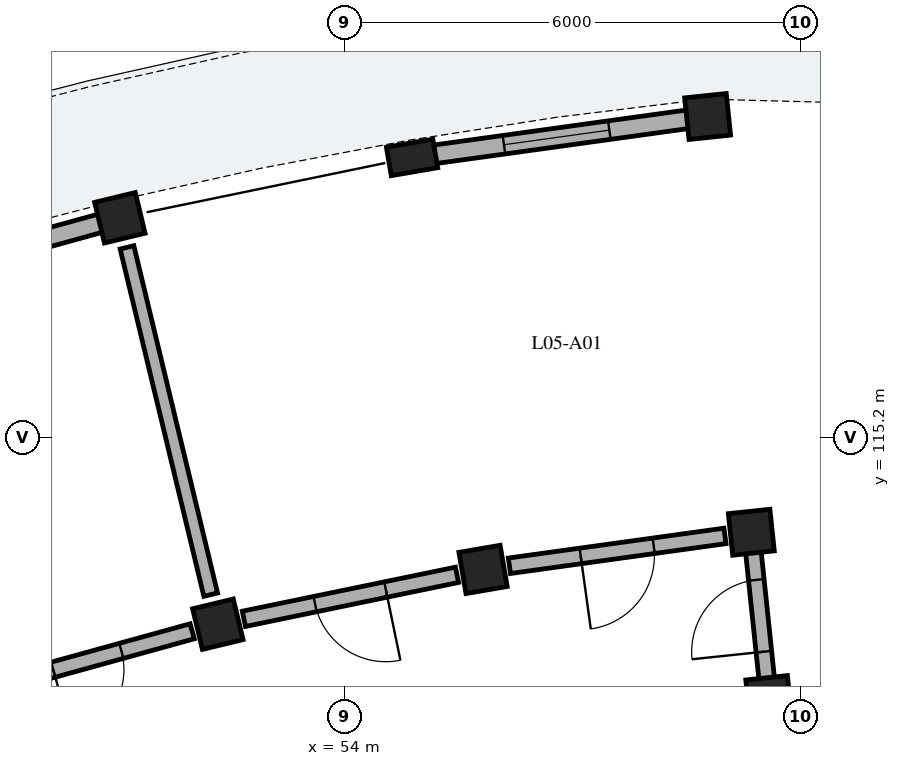
"""IFC4 building model, lengths in metres.
Left out: names, types, materials, properties, quantities, classifications, styles, units other than length and angle.
Written with IfcOpenShell. Run it as: python <this file> out.ifc"""

import sys

from ifc_helpers import new_model, si_unit, direction, frame, frame_2d, origin, origin_2d, place, context, subcontext, project, spatial, rectangle, extrude, element, fill, save


model = new_model("IFC4")
c1 = context("Model", 3, precision=1e-05, world=origin(), true_north=direction((0.0, 1.0)))
c2 = subcontext(c1, "Body", "Model", "MODEL_VIEW")
j1 = project(units=[si_unit("LENGTHUNIT", "METRE"), si_unit("PLANEANGLEUNIT", "RADIAN")], contexts=[c1])
p1 = place(None, origin())
s1 = spatial("IfcSite", under=j1, at=p1, CompositionType="ELEMENT")
p2 = place(p1, origin())
s2 = spatial("IfcBuilding", under=s1, at=p2, CompositionType="ELEMENT")
p3 = place(p2, frame((0.0, 0.0, 18.92)))
s3 = spatial("IfcBuildingStorey", under=s2, at=p3, CompositionType="ELEMENT", Elevation=18.92)
for number, where, z_axis, x_axis in (
    (1, (59.58, 111.766, 0.0), (0.0, 0.0, 1.0), (-0.105, 0.995, 0.0)),
    (2, (59.35, 113.954, 0.0), (0.0, 0.0, 1.0), (-0.105, 0.995, 0.0)),
    (3, (58.775, 119.424, 0.0), (0.0, 0.0, 1.0), (-0.105, 0.995, 0.0)),
    (4, (55.821, 113.465, 0.0), (0.0, 0.0, 1.0), (-0.17, 0.985, 0.0)),
):
    element("IfcColumn", number, at=place(p3, frame(where, z_axis=z_axis, x_axis=x_axis)), inside=s3, PredefinedType="COLUMN", context=c2, shape_type="SweptSolid", body=[
        extrude(rectangle(XDim=0.55, YDim=0.55, at=origin_2d()), origin(), (0.0, 0.0, 1.0), 3.11),
    ])
p4 = place(p3, frame((54.887, 118.885, 0.0), z_axis=(0.0, 0.0, 1.0), x_axis=(-0.169827298811, 0.985473839622, 0.0)))
e5 = element("IfcColumn", 5, at=p4, inside=s3, PredefinedType="PILASTER", context=c2, shape_type="SweptSolid", body=[
    extrude(rectangle(XDim=0.38, YDim=0.62, at=origin_2d()), origin(), (0.0, 0.0, 1.0), 3.11),
])
for number, where, z_axis, x_axis in (
    (6, (52.331, 112.744, 0.0), (0.0, 0.0, 1.0), (-0.234, 0.972, 0.0)),
    (7, (51.042, 118.091, 0.0), (0.0, 0.0, 1.0), (-0.234, 0.972, 0.0)),
):
    element("IfcColumn", number, at=place(p3, frame(where, z_axis=z_axis, x_axis=x_axis)), inside=s3, PredefinedType="COLUMN", context=c2, shape_type="SweptSolid", body=[
        extrude(rectangle(XDim=0.55, YDim=0.55, at=origin_2d()), origin(), (0.0, 0.0, 1.0), 3.11),
    ])
p5 = place(p3, frame((58.533, 119.39, 0.0), z_axis=(0.0, 0.0, 1.0), x_axis=(-0.990539718913, -0.137226328578, 0.0)))
e8 = element("IfcWall", 8, at=p5, inside=s3, PredefinedType="SOLIDWALL", context=c2, shape_type="SweptSolid", body=[
    extrude(rectangle(XDim=3.521, YDim=0.245, at=frame_2d((1.76, 0.0))), origin(), (0.0, 0.0, 1.0), 2.355),
])
p6 = place(p5, frame((1.06, 0.0, 0.35)))
e9 = element("IfcOpeningElement", 9, at=p6, cuts=e8, PredefinedType="OPENING", context=c2, shape_type="SweptSolid", body=[
    extrude(rectangle(XDim=1.4, YDim=1.65, at=frame_2d((0.7, 0.825))), frame((0.0, 0.133, 0.0), z_axis=(0.0, -1.0, 0.0), x_axis=(1.0, 0.0, 0.0)), (0.0, 0.0, 1.0), 0.265),
])
p7 = place(p3, frame((50.806, 118.026, 0.0), z_axis=(0.0, 0.0, 1.0), x_axis=(-0.963899390209, -0.266266718826, 0.0)))
e10 = element("IfcWall", 10, at=p7, inside=s3, PredefinedType="SOLIDWALL", context=c2, shape_type="SweptSolid", body=[
    extrude(rectangle(XDim=3.521, YDim=0.245, at=frame_2d((1.76, 0.0))), origin(), (0.0, 0.0, 1.0), 2.355),
])
p8 = place(p7, frame((1.25, 0.0, 0.0)))
e11 = element("IfcOpeningElement", 11, at=p8, cuts=e10, PredefinedType="OPENING", context=c2, shape_type="SweptSolid", body=[
    extrude(rectangle(XDim=1.02, YDim=2.14, at=frame_2d((0.51, 1.07))), frame((0.0, 0.133, 0.0), z_axis=(0.0, -1.0, 0.0), x_axis=(1.0, 0.0, 0.0)), (0.0, 0.0, 1.0), 0.265),
])
p9 = place(p3, frame((59.004, 113.906, 0.0), z_axis=(0.0, 0.0, 1.0), x_axis=(-0.990544162976, -0.137194246211, 0.0)))
e12 = element("IfcWall", 12, at=p9, inside=s3, PredefinedType="PARTITIONING", context=c2, shape_type="SweptSolid", body=[
    extrude(rectangle(XDim=2.863, YDim=0.205, at=frame_2d((1.432, 0.0))), origin(), (0.0, 0.0, 1.0), 2.37),
])
p10 = place(p9, frame((0.947, 0.0, 0.0)))
e13 = element("IfcOpeningElement", 13, at=p10, cuts=e12, PredefinedType="OPENING", context=c2, shape_type="SweptSolid", body=[
    extrude(rectangle(XDim=0.97, YDim=2.15, at=frame_2d((0.485, 1.075))), frame((0.0, 0.113, 0.0), z_axis=(0.0, -1.0, 0.0), x_axis=(1.0, 0.0, 0.0)), (0.0, 0.0, 1.0), 0.225),
])
p11 = place(p3, frame((55.478, 113.394, 0.0), z_axis=(0.0, 0.0, 1.0), x_axis=(-0.979348418612, -0.202179808492, 0.0)))
e14 = element("IfcWall", 14, at=p11, inside=s3, PredefinedType="PARTITIONING", context=c2, shape_type="SweptSolid", body=[
    extrude(rectangle(XDim=2.863, YDim=0.205, at=frame_2d((1.432, 0.0))), origin(), (0.0, 0.0, 1.0), 2.37),
])
p12 = place(p11, frame((0.957, 0.0, 0.0)))
e15 = element("IfcOpeningElement", 15, at=p12, cuts=e14, PredefinedType="OPENING", context=c2, shape_type="SweptSolid", body=[
    extrude(rectangle(XDim=0.95, YDim=2.13, at=frame_2d((0.475, 1.065))), frame((0.0, 0.113, 0.0), z_axis=(0.0, -1.0, 0.0), x_axis=(1.0, 0.0, 0.0)), (0.0, 0.0, 1.0), 0.225),
])
p13 = place(p3, frame((52.238, 113.133, 0.0), z_axis=(0.0, 0.0, 1.0), x_axis=(-0.234386624934, 0.972143461662, 0.0)))
e16 = element("IfcWall", 16, at=p13, inside=s3, PredefinedType="PARTITIONING", context=c2, shape_type="SweptSolid", body=[
    extrude(rectangle(XDim=4.7, YDim=0.185, at=frame_2d((2.35, 0.0))), origin(), (0.0, 0.0, 1.0), 2.37),
])
p14 = place(p3, frame((51.994, 112.651, 0.0), z_axis=(0.0, 0.0, 1.0), x_axis=(-0.963890789093, -0.266297853356, 0.0)))
e17 = element("IfcWall", 17, at=p14, inside=s3, PredefinedType="PARTITIONING", context=c2, shape_type="SweptSolid", body=[
    extrude(rectangle(XDim=2.863, YDim=0.205, at=frame_2d((1.432, 0.0))), origin(), (0.0, 0.0, 1.0), 2.37),
])
p15 = place(p14, frame((0.967, 0.0, 0.0)))
e18 = element("IfcOpeningElement", 18, at=p15, cuts=e17, PredefinedType="OPENING", context=c2, shape_type="SweptSolid", body=[
    extrude(rectangle(XDim=0.93, YDim=2.12, at=frame_2d((0.465, 1.06))), frame((0.0, 0.113, 0.0), z_axis=(0.0, -1.0, 0.0), x_axis=(1.0, 0.0, 0.0)), (0.0, 0.0, 1.0), 0.225),
])
p16 = place(p3, frame((59.575, 111.816, 0.0), z_axis=(0.0, 0.0, 1.0), x_axis=(-0.104509292252, 0.994523910136, 0.0)))
e19 = element("IfcWall", 19, at=p16, inside=s3, PredefinedType="PARTITIONING", context=c2, shape_type="SweptSolid", body=[
    extrude(rectangle(XDim=2.1, YDim=0.205, at=frame_2d((1.05, 0.0))), origin(), (0.0, 0.0, 1.0), 2.37),
])
p17 = place(p16, frame((0.57, 0.0, 0.0)))
e20 = element("IfcOpeningElement", 20, at=p17, cuts=e19, PredefinedType="OPENING", context=c2, shape_type="SweptSolid", body=[
    extrude(rectangle(XDim=0.95, YDim=2.13, at=frame_2d((0.475, 1.065))), frame((0.0, 0.113, 0.0), z_axis=(0.0, -1.0, 0.0), x_axis=(1.0, 0.0, 0.0)), (0.0, 0.0, 1.0), 0.225),
])
p18 = place(p6, origin())
e21 = element("IfcWindow", 21, at=p18, inside=s3, PartitioningType="SINGLE_PANEL", PredefinedType="WINDOW", context=c2, shape_type="SweptSolid", body=[
    extrude(rectangle(XDim=1.4, YDim=1.65, at=frame_2d((0.7, 0.825))), frame((0.0, 0.03, 0.0), z_axis=(0.0, -1.0, 0.0), x_axis=(1.0, 0.0, 0.0)), (0.0, 0.0, 1.0), 0.06),
])
fill(e9, e21)
p19 = place(p10, origin())
e22 = element("IfcDoor", 22, at=p19, inside=s3, OperationType="SINGLE_SWING_RIGHT", PredefinedType="DOOR", context=c2, shape_type="SweptSolid", body=[
    extrude(rectangle(XDim=0.97, YDim=2.15, at=frame_2d((0.485, 1.075))), frame((0.0, 0.025, 0.0), z_axis=(0.0, -1.0, 0.0), x_axis=(1.0, 0.0, 0.0)), (0.0, 0.0, 1.0), 0.05),
])
fill(e13, e22)
p20 = place(p12, origin())
e23 = element("IfcDoor", 23, at=p20, inside=s3, OperationType="SINGLE_SWING_LEFT", PredefinedType="DOOR", context=c2, shape_type="SweptSolid", body=[
    extrude(rectangle(XDim=0.95, YDim=2.13, at=frame_2d((0.475, 1.065))), frame((0.0, 0.025, 0.0), z_axis=(0.0, -1.0, 0.0), x_axis=(1.0, 0.0, 0.0)), (0.0, 0.0, 1.0), 0.05),
])
fill(e15, e23)
p21 = place(p15, origin())
e24 = element("IfcDoor", 24, at=p21, inside=s3, OperationType="SINGLE_SWING_RIGHT", PredefinedType="DOOR", context=c2, shape_type="SweptSolid", body=[
    extrude(rectangle(XDim=0.93, YDim=2.12, at=frame_2d((0.465, 1.06))), frame((0.0, 0.025, 0.0), z_axis=(0.0, -1.0, 0.0), x_axis=(1.0, 0.0, 0.0)), (0.0, 0.0, 1.0), 0.05),
])
fill(e18, e24)
p22 = place(p17, origin())
e25 = element("IfcDoor", 25, at=p22, inside=s3, OperationType="SINGLE_SWING_LEFT", PredefinedType="DOOR", context=c2, shape_type="SweptSolid", body=[
    extrude(rectangle(XDim=0.95, YDim=2.13, at=frame_2d((0.475, 1.065))), frame((0.0, 0.025, 0.0), z_axis=(0.0, -1.0, 0.0), x_axis=(1.0, 0.0, 0.0)), (0.0, 0.0, 1.0), 0.05),
])
fill(e20, e25)
save(model, sys.argv[1])
